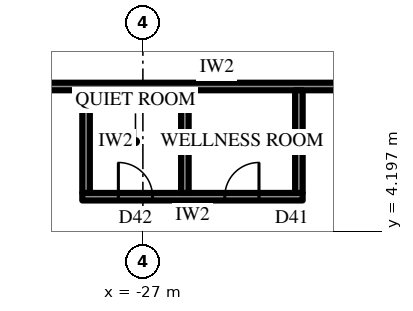
"""IFC4 building model, lengths in metres.
Left out: names, types, materials, properties, quantities, classifications, styles, units other than length and angle.
Written with IfcOpenShell. Run it as: python <this file> out.ifc"""

import sys

from ifc_helpers import new_model, si_unit, direction, frame, frame_2d, origin, place, context, subcontext, project, spatial, rectangle, extrude, element, fill, save


model = new_model("IFC4")
c1 = context("Model", 3, precision=1e-05, world=origin(), true_north=direction((0.0, 1.0)))
c2 = subcontext(c1, "Body", "Model", "MODEL_VIEW")
j1 = project(units=[si_unit("LENGTHUNIT", "METRE"), si_unit("PLANEANGLEUNIT", "RADIAN")], contexts=[c1])
p1 = place(None, origin())
s1 = spatial("IfcSite", under=j1, at=p1, CompositionType="ELEMENT")
p2 = place(p1, origin())
s2 = spatial("IfcBuilding", under=s1, at=p2, CompositionType="ELEMENT")
p3 = place(p2, frame((0.0, 0.0, 136.3)))
s3 = spatial("IfcBuildingStorey", under=s2, at=p3, CompositionType="ELEMENT", Elevation=136.3)
p4 = place(p3, frame((-18.6, 8.0, 0.0), z_axis=(0.0, 0.0, 1.0), x_axis=(-1.0, 0.0, 0.0)))
e1 = element("IfcWall", 1, at=p4, inside=s3, PredefinedType="PARTITIONING", context=c2, shape_type="SweptSolid", body=[
    extrude(rectangle(XDim=12.9, YDim=0.2, at=frame_2d((6.45, 0.0))), origin(), (0.0, 0.0, 1.0), 4.0),
])
p5 = place(p4, frame((0.79, 0.0, 0.0)))
e2 = element("IfcOpeningElement", 2, at=p5, cuts=e1, PredefinedType="OPENING", context=c2, shape_type="SweptSolid", body=[
    extrude(rectangle(XDim=1.0, YDim=2.2, at=frame_2d((0.5, 1.1))), frame((0.0, 0.11, 0.0), z_axis=(0.0, -1.0, 0.0), x_axis=(1.0, 0.0, 0.0)), (0.0, 0.0, 1.0), 0.22),
])
p6 = place(p3, frame((-22.795, 5.1, 0.0), z_axis=(0.0, 0.0, 1.0), x_axis=(-1.0, 0.0, 0.0)))
e3 = element("IfcWall", 3, at=p6, inside=s3, PredefinedType="PARTITIONING", context=c2, shape_type="SweptSolid", body=[
    extrude(rectangle(XDim=5.8, YDim=0.2, at=frame_2d((2.9, 0.0))), origin(), (0.0, 0.0, 1.0), 4.0),
])
p7 = place(p6, frame((1.15, 0.0, 0.0)))
e4 = element("IfcOpeningElement", 4, at=p7, cuts=e3, PredefinedType="OPENING", context=c2, shape_type="SweptSolid", body=[
    extrude(rectangle(XDim=0.9, YDim=2.2, at=frame_2d((0.45, 1.1))), frame((0.0, 0.11, 0.0), z_axis=(0.0, -1.0, 0.0), x_axis=(1.0, 0.0, 0.0)), (0.0, 0.0, 1.0), 0.22),
])
p8 = place(p6, frame((3.95, 0.0, 0.0)))
e5 = element("IfcOpeningElement", 5, at=p8, cuts=e3, PredefinedType="OPENING", context=c2, shape_type="SweptSolid", body=[
    extrude(rectangle(XDim=0.9, YDim=2.2, at=frame_2d((0.45, 1.1))), frame((0.0, 0.11, 0.0), z_axis=(0.0, -1.0, 0.0), x_axis=(1.0, 0.0, 0.0)), (0.0, 0.0, 1.0), 0.22),
])
for number, where, z_axis, x_axis in (
    (6, (-22.895, 7.9, 0.0), (0.0, 0.0, 1.0), (0.0, -1.0, 0.0)),
    (7, (-25.895, 7.9, 0.0), (0.0, 0.0, 1.0), (0.0, -1.0, 0.0)),
    (8, (-28.495, 7.9, 0.0), (0.0, 0.0, 1.0), (0.0, -1.0, 0.0)),
):
    element("IfcWall", number, at=place(p3, frame(where, z_axis=z_axis, x_axis=x_axis)), inside=s3, PredefinedType="PARTITIONING", context=c2, shape_type="SweptSolid", body=[
        extrude(rectangle(XDim=2.7, YDim=0.2, at=frame_2d((1.35, 0.0))), origin(), (0.0, 0.0, 1.0), 4.0),
    ])
p9 = place(p7, frame((0.9, 0.0, 0.0), z_axis=(0.0, 0.0, 1.0), x_axis=(-1.0, 0.0, 0.0)))
e9 = element("IfcDoor", 9, at=p9, inside=s3, OperationType="SINGLE_SWING_LEFT", PredefinedType="DOOR", context=c2, shape_type="SweptSolid", body=[
    extrude(rectangle(XDim=0.9, YDim=2.2, at=frame_2d((0.45, 1.1))), frame((0.0, 0.025, 0.0), z_axis=(0.0, -1.0, 0.0), x_axis=(1.0, 0.0, 0.0)), (0.0, 0.0, 1.0), 0.05),
])
fill(e4, e9)
p10 = place(p8, frame((0.9, 0.0, 0.0), z_axis=(0.0, 0.0, 1.0), x_axis=(-1.0, 0.0, 0.0)))
e10 = element("IfcDoor", 10, at=p10, inside=s3, OperationType="SINGLE_SWING_RIGHT", PredefinedType="DOOR", context=c2, shape_type="SweptSolid", body=[
    extrude(rectangle(XDim=0.9, YDim=2.2, at=frame_2d((0.45, 1.1))), frame((0.0, 0.025, 0.0), z_axis=(0.0, -1.0, 0.0), x_axis=(1.0, 0.0, 0.0)), (0.0, 0.0, 1.0), 0.05),
])
fill(e5, e10)
save(model, sys.argv[1])
